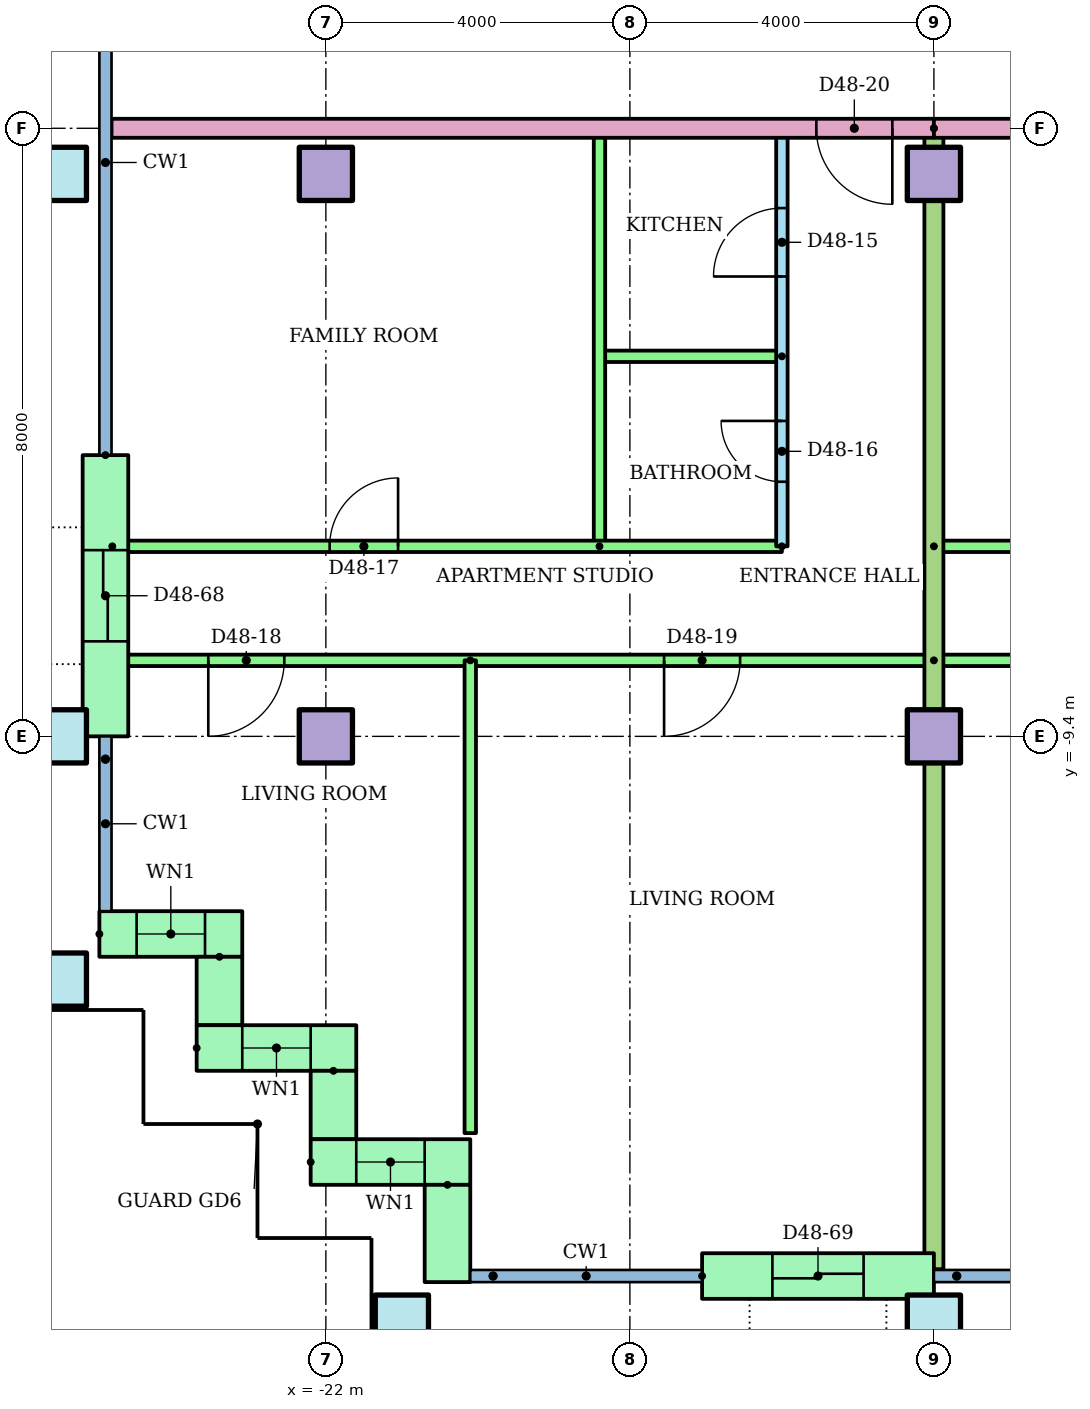
"""IFC4 building model, lengths in metres.
Left out: names, types, materials, properties, quantities, classifications, styles, units other than length and angle.
Written with IfcOpenShell. Run it as: python <this file> out.ifc"""

import sys

from ifc_helpers import new_model, si_unit, direction, frame, frame_2d, origin, origin_2d, place, context, subcontext, project, spatial, rectangle, hollow_rectangle, extrude, element, fill, save


model = new_model("IFC4")
c1 = context("Model", 3, precision=1e-05, world=origin(), true_north=direction((0.0, 1.0)))
c2 = subcontext(c1, "Body", "Model", "MODEL_VIEW")
j1 = project(units=[si_unit("LENGTHUNIT", "METRE"), si_unit("PLANEANGLEUNIT", "RADIAN")], contexts=[c1])
p1 = place(None, origin())
s1 = spatial("IfcSite", under=j1, at=p1, CompositionType="ELEMENT")
p2 = place(p1, origin())
s2 = spatial("IfcBuilding", under=s1, at=p2, CompositionType="ELEMENT")
p3 = place(p2, frame((0.0, 0.0, 184.5)))
s3 = spatial("IfcBuildingStorey", under=s2, at=p3, CompositionType="ELEMENT", Elevation=184.5)
for number, where in (
    (1, (-21.0, -17.1, 0.0)),
    (2, (-14.0, -17.1, 0.0)),
    (3, (-25.5, -12.6, 0.0)),
    (4, (-25.5, -9.4, 0.0)),
):
    element("IfcColumn", number, at=place(p3, frame(where)), inside=s3, PredefinedType="COLUMN", context=c2, shape_type="SweptSolid", body=[
        extrude(hollow_rectangle(XDim=0.7, YDim=0.7, WallThickness=0.036, at=origin_2d()), origin(), (0.0, 0.0, 1.0), 3.2),
    ])
for number, where in (
    (5, (-22.0, -9.4, 0.0)),
    (6, (-14.0, -9.4, 0.0)),
):
    element("IfcColumn", number, at=place(p3, frame(where)), inside=s3, PredefinedType="COLUMN", context=c2, shape_type="SweptSolid", body=[
        extrude(rectangle(XDim=0.7, YDim=0.7, at=origin_2d()), origin(), (0.0, 0.0, 1.0), 3.2),
    ])
p4 = place(p3, frame((-25.5, -2.0, 0.0)))
e7 = element("IfcColumn", 7, at=p4, inside=s3, PredefinedType="COLUMN", context=c2, shape_type="SweptSolid", body=[
    extrude(hollow_rectangle(XDim=0.7, YDim=0.7, WallThickness=0.036, at=origin_2d()), origin(), (0.0, 0.0, 1.0), 3.2),
])
for number, where in (
    (8, (-22.0, -2.0, 0.0)),
    (9, (-14.0, -2.0, 0.0)),
):
    element("IfcColumn", number, at=place(p3, frame(where)), inside=s3, PredefinedType="COLUMN", context=c2, shape_type="SweptSolid", body=[
        extrude(rectangle(XDim=0.7, YDim=0.7, at=origin_2d()), origin(), (0.0, 0.0, 1.0), 3.2),
    ])
p5 = place(p3, frame((-24.9, -5.7, 0.0), z_axis=(0.0, 0.0, 1.0), x_axis=(0.0, -1.0, 0.0)))
e10 = element("IfcWall", 10, at=p5, inside=s3, PredefinedType="STANDARD", context=c2, shape_type="SweptSolid", body=[
    extrude(rectangle(XDim=3.7, YDim=0.6, at=frame_2d((1.85, 0.0))), origin(), (0.0, 0.0, 1.0), 2.92),
])
p6 = place(p5, frame((1.25, 0.0, 0.0)))
e11 = element("IfcOpeningElement", 11, at=p6, cuts=e10, PredefinedType="OPENING", context=c2, shape_type="SweptSolid", body=[
    extrude(rectangle(XDim=1.2, YDim=2.1, at=frame_2d((0.6, 1.05))), frame((0.0, 0.31, 0.0), z_axis=(0.0, -1.0, 0.0), x_axis=(1.0, 0.0, 0.0)), (0.0, 0.0, 1.0), 0.62),
])
p7 = place(p3, frame((-24.98, -12.0, 0.0)))
e12 = element("IfcWall", 12, at=p7, inside=s3, PredefinedType="STANDARD", context=c2, shape_type="SweptSolid", body=[
    extrude(rectangle(XDim=1.88, YDim=0.6, at=frame_2d((0.94, 0.0))), origin(), (0.0, 0.0, 1.0), 2.92),
])
p8 = place(p7, frame((0.49, 0.0, 0.9)))
e13 = element("IfcOpeningElement", 13, at=p8, cuts=e12, PredefinedType="OPENING", context=c2, shape_type="SweptSolid", body=[
    extrude(rectangle(XDim=0.9, YDim=1.5, at=frame_2d((0.45, 0.75))), frame((0.0, 0.31, 0.0), z_axis=(0.0, -1.0, 0.0), x_axis=(1.0, 0.0, 0.0)), (0.0, 0.0, 1.0), 0.62),
])
p9 = place(p3, frame((-23.4, -12.3, 0.0), z_axis=(0.0, 0.0, 1.0), x_axis=(0.0, -1.0, 0.0)))
e14 = element("IfcWall", 14, at=p9, inside=s3, PredefinedType="STANDARD", context=c2, shape_type="SweptSolid", body=[
    extrude(rectangle(XDim=0.9, YDim=0.6, at=frame_2d((0.45, 0.0))), origin(), (0.0, 0.0, 1.0), 2.92),
])
p10 = place(p3, frame((-23.7, -13.5, 0.0)))
e15 = element("IfcWall", 15, at=p10, inside=s3, PredefinedType="STANDARD", context=c2, shape_type="SweptSolid", body=[
    extrude(rectangle(XDim=2.1, YDim=0.6, at=frame_2d((1.05, 0.0))), origin(), (0.0, 0.0, 1.0), 2.92),
])
p11 = place(p10, frame((0.6, 0.0, 0.9)))
e16 = element("IfcOpeningElement", 16, at=p11, cuts=e15, PredefinedType="OPENING", context=c2, shape_type="SweptSolid", body=[
    extrude(rectangle(XDim=0.9, YDim=1.5, at=frame_2d((0.45, 0.75))), frame((0.0, 0.31, 0.0), z_axis=(0.0, -1.0, 0.0), x_axis=(1.0, 0.0, 0.0)), (0.0, 0.0, 1.0), 0.62),
])
p12 = place(p3, frame((-21.9, -13.8, 0.0), z_axis=(0.0, 0.0, 1.0), x_axis=(0.0, -1.0, 0.0)))
e17 = element("IfcWall", 17, at=p12, inside=s3, PredefinedType="STANDARD", context=c2, shape_type="SweptSolid", body=[
    extrude(rectangle(XDim=0.9, YDim=0.6, at=frame_2d((0.45, 0.0))), origin(), (0.0, 0.0, 1.0), 2.92),
])
p13 = place(p3, frame((-22.2, -15.0, 0.0)))
e18 = element("IfcWall", 18, at=p13, inside=s3, PredefinedType="STANDARD", context=c2, shape_type="SweptSolid", body=[
    extrude(rectangle(XDim=2.1, YDim=0.6, at=frame_2d((1.05, 0.0))), origin(), (0.0, 0.0, 1.0), 2.92),
])
p14 = place(p13, frame((0.6, 0.0, 0.9)))
e19 = element("IfcOpeningElement", 19, at=p14, cuts=e18, PredefinedType="OPENING", context=c2, shape_type="SweptSolid", body=[
    extrude(rectangle(XDim=0.9, YDim=1.5, at=frame_2d((0.45, 0.75))), frame((0.0, 0.31, 0.0), z_axis=(0.0, -1.0, 0.0), x_axis=(1.0, 0.0, 0.0)), (0.0, 0.0, 1.0), 0.62),
])
p15 = place(p3, frame((-20.4, -15.3, 0.0), z_axis=(0.0, 0.0, 1.0), x_axis=(0.0, -1.0, 0.0)))
e20 = element("IfcWall", 20, at=p15, inside=s3, PredefinedType="STANDARD", context=c2, shape_type="SweptSolid", body=[
    extrude(rectangle(XDim=1.28, YDim=0.6, at=frame_2d((0.64, 0.0))), origin(), (0.0, 0.0, 1.0), 2.92),
])
p16 = place(p3, frame((-17.05, -16.5, 0.0)))
e21 = element("IfcWall", 21, at=p16, inside=s3, PredefinedType="STANDARD", context=c2, shape_type="SweptSolid", body=[
    extrude(rectangle(XDim=3.05, YDim=0.6, at=frame_2d((1.525, 0.0))), origin(), (0.0, 0.0, 1.0), 2.92),
])
p17 = place(p16, frame((0.925, 0.0, 0.0)))
e22 = element("IfcOpeningElement", 22, at=p17, cuts=e21, PredefinedType="OPENING", context=c2, shape_type="SweptSolid", body=[
    extrude(rectangle(XDim=1.2, YDim=2.1, at=frame_2d((0.6, 1.05))), frame((0.0, 0.31, 0.0), z_axis=(0.0, -1.0, 0.0), x_axis=(1.0, 0.0, 0.0)), (0.0, 0.0, 1.0), 0.62),
])
p18 = place(p3, frame((-16.0, -6.9, 0.0), z_axis=(0.0, 0.0, 1.0), x_axis=(0.0, 1.0, 0.0)))
e23 = element("IfcWall", 23, at=p18, inside=s3, PredefinedType="PARTITIONING", context=c2, shape_type="SweptSolid", body=[
    extrude(rectangle(XDim=5.5, YDim=0.15, at=frame_2d((2.75, 0.0))), origin(), (0.0, 0.0, 1.0), 2.4),
])
p19 = place(p18, frame((3.55, 0.0, 0.0)))
e24 = element("IfcOpeningElement", 24, at=p19, cuts=e23, PredefinedType="OPENING", context=c2, shape_type="SweptSolid", body=[
    extrude(rectangle(XDim=0.9, YDim=2.1, at=frame_2d((0.45, 1.05))), frame((0.0, 0.085, 0.0), z_axis=(0.0, -1.0, 0.0), x_axis=(1.0, 0.0, 0.0)), (0.0, 0.0, 1.0), 0.17),
])
p20 = place(p18, frame((0.85, 0.0, 0.0)))
e25 = element("IfcOpeningElement", 25, at=p20, cuts=e23, PredefinedType="OPENING", context=c2, shape_type="SweptSolid", body=[
    extrude(rectangle(XDim=0.8, YDim=2.1, at=frame_2d((0.4, 1.05))), frame((0.0, 0.085, 0.0), z_axis=(0.0, -1.0, 0.0), x_axis=(1.0, 0.0, 0.0)), (0.0, 0.0, 1.0), 0.17),
])
p21 = place(p3, frame((-16.0, -4.4, 0.0), z_axis=(0.0, 0.0, 1.0), x_axis=(-1.0, 0.0, 0.0)))
e26 = element("IfcWall", 26, at=p21, inside=s3, PredefinedType="PARTITIONING", context=c2, shape_type="SweptSolid", body=[
    extrude(rectangle(XDim=2.4, YDim=0.15, at=frame_2d((1.2, 0.0))), origin(), (0.0, 0.0, 1.0), 2.4),
])
p22 = place(p3, frame((-18.4, -6.9, 0.0), z_axis=(0.0, 0.0, 1.0), x_axis=(0.0, 1.0, 0.0)))
e27 = element("IfcWall", 27, at=p22, inside=s3, PredefinedType="PARTITIONING", context=c2, shape_type="SweptSolid", body=[
    extrude(rectangle(XDim=5.5, YDim=0.15, at=frame_2d((2.75, 0.0))), origin(), (0.0, 0.0, 1.0), 2.4),
])
p23 = place(p3, frame((-24.81, -6.9, 0.0)))
e28 = element("IfcWall", 28, at=p23, inside=s3, PredefinedType="PARTITIONING", context=c2, shape_type="SweptSolid", body=[
    extrude(rectangle(XDim=8.81, YDim=0.15, at=frame_2d((4.405, 0.0))), origin(), (0.0, 0.0, 1.0), 2.4),
])
p24 = place(p23, frame((2.86, 0.0, 0.0)))
e29 = element("IfcOpeningElement", 29, at=p24, cuts=e28, PredefinedType="OPENING", context=c2, shape_type="SweptSolid", body=[
    extrude(rectangle(XDim=0.9, YDim=2.1, at=frame_2d((0.45, 1.05))), frame((0.0, 0.085, 0.0), z_axis=(0.0, -1.0, 0.0), x_axis=(1.0, 0.0, 0.0)), (0.0, 0.0, 1.0), 0.17),
])
p25 = place(p3, frame((-14.0, -8.4, 0.0), z_axis=(0.0, 0.0, 1.0), x_axis=(-1.0, 0.0, 0.0)))
e30 = element("IfcWall", 30, at=p25, inside=s3, PredefinedType="PARTITIONING", context=c2, shape_type="SweptSolid", body=[
    extrude(rectangle(XDim=10.81, YDim=0.15, at=frame_2d((5.405, 0.0))), origin(), (0.0, 0.0, 1.0), 2.4),
])
p26 = place(p25, frame((8.547, 0.0, 0.0)))
e31 = element("IfcOpeningElement", 31, at=p26, cuts=e30, PredefinedType="OPENING", context=c2, shape_type="SweptSolid", body=[
    extrude(rectangle(XDim=1.0, YDim=2.1, at=frame_2d((0.5, 1.05))), frame((0.0, 0.085, 0.0), z_axis=(0.0, -1.0, 0.0), x_axis=(1.0, 0.0, 0.0)), (0.0, 0.0, 1.0), 0.17),
])
p27 = place(p25, frame((2.55, 0.0, 0.0)))
e32 = element("IfcOpeningElement", 32, at=p27, cuts=e30, PredefinedType="OPENING", context=c2, shape_type="SweptSolid", body=[
    extrude(rectangle(XDim=1.0, YDim=2.1, at=frame_2d((0.5, 1.05))), frame((0.0, 0.085, 0.0), z_axis=(0.0, -1.0, 0.0), x_axis=(1.0, 0.0, 0.0)), (0.0, 0.0, 1.0), 0.17),
])
p28 = place(p3, frame((-20.1, -8.4, 0.0), z_axis=(0.0, 0.0, 1.0), x_axis=(0.0, -1.0, 0.0)))
e33 = element("IfcWall", 33, at=p28, inside=s3, PredefinedType="PARTITIONING", context=c2, shape_type="SweptSolid", body=[
    extrude(rectangle(XDim=6.22, YDim=0.15, at=frame_2d((3.11, 0.0))), origin(), (0.0, 0.0, 1.0), 2.4),
])
p29 = place(p3, frame((-14.0, -6.9, 0.0)))
e34 = element("IfcWall", 34, at=p29, inside=s3, PredefinedType="PARTITIONING", context=c2, shape_type="SweptSolid", body=[
    extrude(rectangle(XDim=22.0, YDim=0.15, at=frame_2d((11.0, 0.0))), origin(), (0.0, 0.0, 1.0), 2.4),
])
p30 = place(p29, frame((16.65, 0.0, 0.0)))
e35 = element("IfcOpeningElement", 35, at=p30, cuts=e34, PredefinedType="OPENING", context=c2, shape_type="SweptSolid", body=[
    extrude(rectangle(XDim=0.9, YDim=2.1, at=frame_2d((0.45, 1.05))), frame((0.0, 0.085, 0.0), z_axis=(0.0, -1.0, 0.0), x_axis=(1.0, 0.0, 0.0)), (0.0, 0.0, 1.0), 0.17),
])
p31 = place(p29, frame((10.9, 0.0, 0.0)))
e36 = element("IfcOpeningElement", 36, at=p31, cuts=e34, PredefinedType="OPENING", context=c2, shape_type="SweptSolid", body=[
    extrude(rectangle(XDim=0.9, YDim=2.1, at=frame_2d((0.45, 1.05))), frame((0.0, 0.085, 0.0), z_axis=(0.0, -1.0, 0.0), x_axis=(1.0, 0.0, 0.0)), (0.0, 0.0, 1.0), 0.17),
])
p32 = place(p29, frame((3.6, 0.0, 0.0)))
e37 = element("IfcOpeningElement", 37, at=p32, cuts=e34, PredefinedType="OPENING", context=c2, shape_type="SweptSolid", body=[
    extrude(rectangle(XDim=0.9, YDim=2.1, at=frame_2d((0.45, 1.05))), frame((0.0, 0.085, 0.0), z_axis=(0.0, -1.0, 0.0), x_axis=(1.0, 0.0, 0.0)), (0.0, 0.0, 1.0), 0.17),
])
p33 = place(p3, frame((10.0, -8.4, 0.0), z_axis=(0.0, 0.0, 1.0), x_axis=(-1.0, 0.0, 0.0)))
e38 = element("IfcWall", 38, at=p33, inside=s3, PredefinedType="PARTITIONING", context=c2, shape_type="SweptSolid", body=[
    extrude(rectangle(XDim=24.0, YDim=0.15, at=frame_2d((12.0, 0.0))), origin(), (0.0, 0.0, 1.0), 2.4),
])
p34 = place(p33, frame((19.5, 0.0, 0.0)))
e39 = element("IfcOpeningElement", 39, at=p34, cuts=e38, PredefinedType="OPENING", context=c2, shape_type="SweptSolid", body=[
    extrude(rectangle(XDim=1.0, YDim=2.1, at=frame_2d((0.5, 1.05))), frame((0.0, 0.085, 0.0), z_axis=(0.0, -1.0, 0.0), x_axis=(1.0, 0.0, 0.0)), (0.0, 0.0, 1.0), 0.17),
])
p35 = place(p33, frame((13.55, 0.0, 0.0)))
e40 = element("IfcOpeningElement", 40, at=p35, cuts=e38, PredefinedType="OPENING", context=c2, shape_type="SweptSolid", body=[
    extrude(rectangle(XDim=0.9, YDim=2.1, at=frame_2d((0.45, 1.05))), frame((0.0, 0.085, 0.0), z_axis=(0.0, -1.0, 0.0), x_axis=(1.0, 0.0, 0.0)), (0.0, 0.0, 1.0), 0.17),
])
p36 = place(p33, frame((9.55, 0.0, 0.0)))
e41 = element("IfcOpeningElement", 41, at=p36, cuts=e38, PredefinedType="OPENING", context=c2, shape_type="SweptSolid", body=[
    extrude(rectangle(XDim=0.9, YDim=2.1, at=frame_2d((0.45, 1.05))), frame((0.0, 0.085, 0.0), z_axis=(0.0, -1.0, 0.0), x_axis=(1.0, 0.0, 0.0)), (0.0, 0.0, 1.0), 0.17),
])
p37 = place(p33, frame((5.55, 0.0, 0.0)))
e42 = element("IfcOpeningElement", 42, at=p37, cuts=e38, PredefinedType="OPENING", context=c2, shape_type="SweptSolid", body=[
    extrude(rectangle(XDim=0.9, YDim=2.1, at=frame_2d((0.45, 1.05))), frame((0.0, 0.085, 0.0), z_axis=(0.0, -1.0, 0.0), x_axis=(1.0, 0.0, 0.0)), (0.0, 0.0, 1.0), 0.17),
])
p38 = place(p33, frame((1.55, 0.0, 0.0)))
e43 = element("IfcOpeningElement", 43, at=p38, cuts=e38, PredefinedType="OPENING", context=c2, shape_type="SweptSolid", body=[
    extrude(rectangle(XDim=0.9, YDim=2.1, at=frame_2d((0.45, 1.05))), frame((0.0, 0.085, 0.0), z_axis=(0.0, -1.0, 0.0), x_axis=(1.0, 0.0, 0.0)), (0.0, 0.0, 1.0), 0.17),
])
p39 = place(p3, frame((-14.0, -1.4, 0.0), z_axis=(0.0, 0.0, 1.0), x_axis=(0.0, -1.0, 0.0)))
e44 = element("IfcWall", 44, at=p39, inside=s3, PredefinedType="PARTITIONING", context=c2, shape_type="SweptSolid", body=[
    extrude(rectangle(XDim=15.01, YDim=0.25, at=frame_2d((7.505, 0.0))), origin(), (0.0, 0.0, 1.0), 2.4),
])
p40 = place(p3, frame((-14.0, -1.4, 0.0), z_axis=(0.0, 0.0, 1.0), x_axis=(-1.0, 0.0, 0.0)))
e45 = element("IfcWall", 45, at=p40, inside=s3, PredefinedType="PARTITIONING", context=c2, shape_type="SweptSolid", body=[
    extrude(rectangle(XDim=10.82, YDim=0.25, at=frame_2d((5.41, 0.0))), origin(), (0.0, 0.0, 1.0), 2.4),
])
p41 = place(p40, frame((0.547, 0.0, 0.0)))
e46 = element("IfcOpeningElement", 46, at=p41, cuts=e45, PredefinedType="OPENING", context=c2, shape_type="SweptSolid", body=[
    extrude(rectangle(XDim=1.0, YDim=2.1, at=frame_2d((0.5, 1.05))), frame((0.0, 0.135, 0.0), z_axis=(0.0, -1.0, 0.0), x_axis=(1.0, 0.0, 0.0)), (0.0, 0.0, 1.0), 0.27),
])
p42 = place(p3, frame((14.0, -1.4, 0.0), z_axis=(0.0, 0.0, 1.0), x_axis=(-1.0, 0.0, 0.0)))
e47 = element("IfcWall", 47, at=p42, inside=s3, PredefinedType="PARTITIONING", context=c2, shape_type="SweptSolid", body=[
    extrude(rectangle(XDim=28.0, YDim=0.25, at=frame_2d((14.0, 0.0))), origin(), (0.0, 0.0, 1.0), 2.4),
])
p43 = place(p42, frame((4.547, 0.0, 0.0)))
e48 = element("IfcOpeningElement", 48, at=p43, cuts=e47, PredefinedType="OPENING", context=c2, shape_type="SweptSolid", body=[
    extrude(rectangle(XDim=1.0, YDim=2.1, at=frame_2d((0.5, 1.05))), frame((0.0, 0.135, 0.0), z_axis=(0.0, -1.0, 0.0), x_axis=(1.0, 0.0, 0.0)), (0.0, 0.0, 1.0), 0.27),
])
p44 = place(p42, frame((2.453, 0.0, 0.0)))
e49 = element("IfcOpeningElement", 49, at=p44, cuts=e47, PredefinedType="OPENING", context=c2, shape_type="SweptSolid", body=[
    extrude(rectangle(XDim=1.0, YDim=2.1, at=frame_2d((0.5, 1.05))), frame((0.0, 0.135, 0.0), z_axis=(0.0, -1.0, 0.0), x_axis=(1.0, 0.0, 0.0)), (0.0, 0.0, 1.0), 0.27),
])
p45 = place(p8, origin())
e50 = element("IfcWindow", 50, at=p45, inside=s3, PartitioningType="SINGLE_PANEL", PredefinedType="WINDOW", context=c2, shape_type="SweptSolid", body=[
    extrude(rectangle(XDim=0.9, YDim=1.5, at=frame_2d((0.45, 0.75))), frame((0.0, 0.03, 0.0), z_axis=(0.0, -1.0, 0.0), x_axis=(1.0, 0.0, 0.0)), (0.0, 0.0, 1.0), 0.06),
])
fill(e13, e50)
p46 = place(p11, origin())
e51 = element("IfcWindow", 51, at=p46, inside=s3, PartitioningType="SINGLE_PANEL", PredefinedType="WINDOW", context=c2, shape_type="SweptSolid", body=[
    extrude(rectangle(XDim=0.9, YDim=1.5, at=frame_2d((0.45, 0.75))), frame((0.0, 0.03, 0.0), z_axis=(0.0, -1.0, 0.0), x_axis=(1.0, 0.0, 0.0)), (0.0, 0.0, 1.0), 0.06),
])
fill(e16, e51)
p47 = place(p14, origin())
e52 = element("IfcWindow", 52, at=p47, inside=s3, PartitioningType="SINGLE_PANEL", PredefinedType="WINDOW", context=c2, shape_type="SweptSolid", body=[
    extrude(rectangle(XDim=0.9, YDim=1.5, at=frame_2d((0.45, 0.75))), frame((0.0, 0.03, 0.0), z_axis=(0.0, -1.0, 0.0), x_axis=(1.0, 0.0, 0.0)), (0.0, 0.0, 1.0), 0.06),
])
fill(e19, e52)
p48 = place(p19, origin())
e53 = element("IfcDoor", 53, at=p48, inside=s3, OperationType="SINGLE_SWING_LEFT", PredefinedType="DOOR", context=c2, shape_type="SweptSolid", body=[
    extrude(rectangle(XDim=0.9, YDim=2.1, at=frame_2d((0.45, 1.05))), frame((0.0, 0.025, 0.0), z_axis=(0.0, -1.0, 0.0), x_axis=(1.0, 0.0, 0.0)), (0.0, 0.0, 1.0), 0.05),
])
fill(e24, e53)
p49 = place(p20, origin())
e54 = element("IfcDoor", 54, at=p49, inside=s3, OperationType="SINGLE_SWING_RIGHT", PredefinedType="DOOR", context=c2, shape_type="SweptSolid", body=[
    extrude(rectangle(XDim=0.8, YDim=2.1, at=frame_2d((0.4, 1.05))), frame((0.0, 0.025, 0.0), z_axis=(0.0, -1.0, 0.0), x_axis=(1.0, 0.0, 0.0)), (0.0, 0.0, 1.0), 0.05),
])
fill(e25, e54)
p50 = place(p24, origin())
e55 = element("IfcDoor", 55, at=p50, inside=s3, OperationType="SINGLE_SWING_RIGHT", PredefinedType="DOOR", context=c2, shape_type="SweptSolid", body=[
    extrude(rectangle(XDim=0.9, YDim=2.1, at=frame_2d((0.45, 1.05))), frame((0.0, 0.025, 0.0), z_axis=(0.0, -1.0, 0.0), x_axis=(1.0, 0.0, 0.0)), (0.0, 0.0, 1.0), 0.05),
])
fill(e29, e55)
p51 = place(p26, origin())
e56 = element("IfcDoor", 56, at=p51, inside=s3, OperationType="SINGLE_SWING_RIGHT", PredefinedType="DOOR", context=c2, shape_type="SweptSolid", body=[
    extrude(rectangle(XDim=1.0, YDim=2.1, at=frame_2d((0.5, 1.05))), frame((0.0, 0.025, 0.0), z_axis=(0.0, -1.0, 0.0), x_axis=(1.0, 0.0, 0.0)), (0.0, 0.0, 1.0), 0.05),
])
fill(e31, e56)
p52 = place(p27, origin())
e57 = element("IfcDoor", 57, at=p52, inside=s3, OperationType="SINGLE_SWING_RIGHT", PredefinedType="DOOR", context=c2, shape_type="SweptSolid", body=[
    extrude(rectangle(XDim=1.0, YDim=2.1, at=frame_2d((0.5, 1.05))), frame((0.0, 0.025, 0.0), z_axis=(0.0, -1.0, 0.0), x_axis=(1.0, 0.0, 0.0)), (0.0, 0.0, 1.0), 0.05),
])
fill(e32, e57)
p53 = place(p41, origin())
e58 = element("IfcDoor", 58, at=p53, inside=s3, OperationType="SINGLE_SWING_LEFT", PredefinedType="DOOR", context=c2, shape_type="SweptSolid", body=[
    extrude(rectangle(XDim=1.0, YDim=2.1, at=frame_2d((0.5, 1.05))), frame((0.0, 0.025, 0.0), z_axis=(0.0, -1.0, 0.0), x_axis=(1.0, 0.0, 0.0)), (0.0, 0.0, 1.0), 0.05),
])
fill(e46, e58)
p54 = place(p6, origin())
e59 = element("IfcDoor", 59, at=p54, inside=s3, OperationType="SLIDING_TO_LEFT", PredefinedType="DOOR", context=c2, shape_type="SweptSolid", body=[
    extrude(rectangle(XDim=1.2, YDim=2.1, at=frame_2d((0.6, 1.05))), frame((0.0, 0.025, 0.0), z_axis=(0.0, -1.0, 0.0), x_axis=(1.0, 0.0, 0.0)), (0.0, 0.0, 1.0), 0.05),
])
fill(e11, e59)
p55 = place(p17, origin())
e60 = element("IfcDoor", 60, at=p55, inside=s3, OperationType="SLIDING_TO_LEFT", PredefinedType="DOOR", context=c2, shape_type="SweptSolid", body=[
    extrude(rectangle(XDim=1.2, YDim=2.1, at=frame_2d((0.6, 1.05))), frame((0.0, 0.025, 0.0), z_axis=(0.0, -1.0, 0.0), x_axis=(1.0, 0.0, 0.0)), (0.0, 0.0, 1.0), 0.05),
])
fill(e22, e60)
save(model, sys.argv[1])
